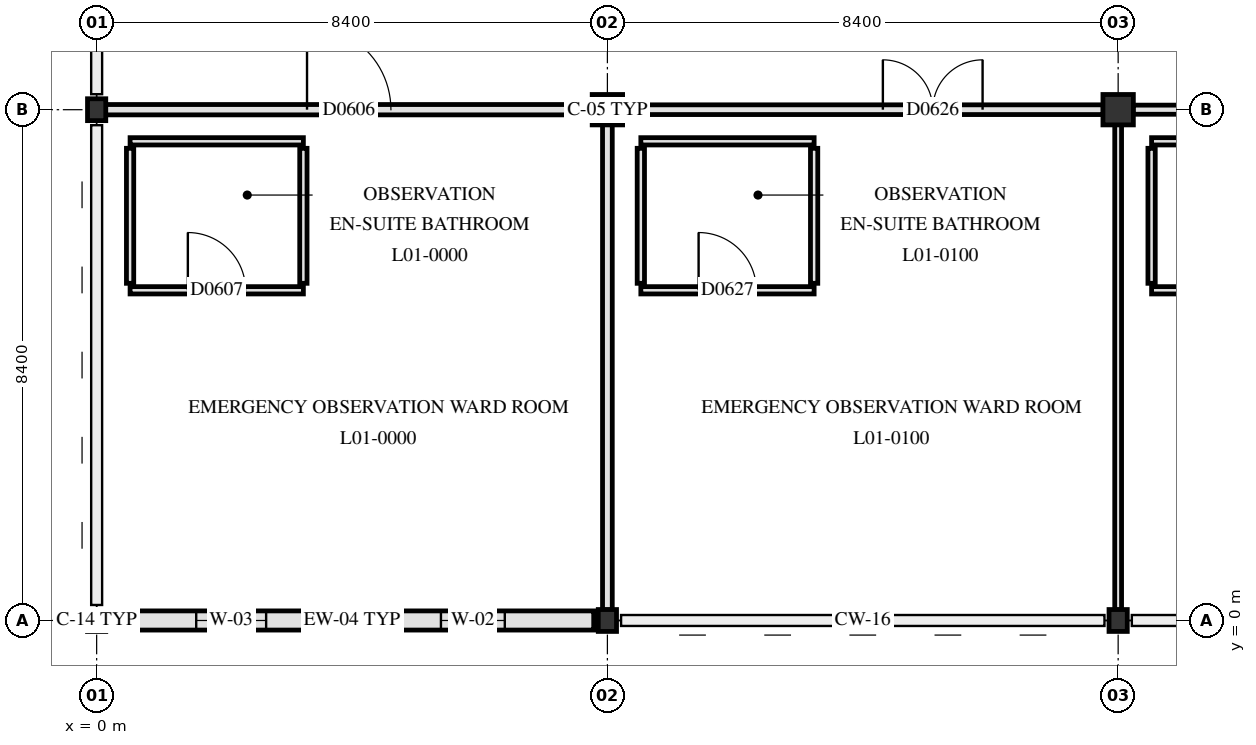
"""IFC4 building model, lengths in metres.
Left out: names, types, materials, properties, quantities, classifications, styles, units other than length and angle.
Written with IfcOpenShell. Run it as: python <this file> out.ifc"""

import sys

from ifc_helpers import new_model, si_unit, direction, frame, frame_2d, origin, origin_2d, place, context, subcontext, project, spatial, rectangle, i_section, extrude, element, fill, save


model = new_model("IFC4")
c1 = context("Model", 3, precision=1e-05, world=origin(), true_north=direction((0.0, 1.0)))
c2 = subcontext(c1, "Body", "Model", "MODEL_VIEW")
j1 = project(units=[si_unit("LENGTHUNIT", "METRE"), si_unit("PLANEANGLEUNIT", "RADIAN")], contexts=[c1])
p1 = place(None, origin())
s1 = spatial("IfcSite", under=j1, at=p1, CompositionType="ELEMENT")
p2 = place(p1, origin())
s2 = spatial("IfcBuilding", under=s1, at=p2, CompositionType="ELEMENT")
p3 = place(p2, frame((0.0, 0.0, 4.8)))
s3 = spatial("IfcBuildingStorey", under=s2, at=p3, CompositionType="ELEMENT", Elevation=4.8)
for number, where, z_axis, x_axis in (
    (1, (0.0, 0.0, 0.0), (0.0, 0.0, 1.0), (1.0, 0.0, 0.0)),
    (2, (0.0, 8.4, 0.0), (0.0, 0.0, 1.0), (1.0, 0.0, 0.0)),
    (3, (8.4, 0.0, 0.0), (0.0, 0.0, 1.0), (1.0, 0.0, 0.0)),
):
    element("IfcColumn", number, at=place(p3, frame(where, z_axis=z_axis, x_axis=x_axis)), inside=s3, PredefinedType="COLUMN", context=c2, shape_type="SweptSolid", body=[
        extrude(i_section(OverallWidth=0.3, OverallDepth=0.36, WebThickness=0.012, FlangeThickness=0.022, FilletRadius=0.027, at=origin_2d()), origin(), (0.0, 0.0, 1.0), 4.5),
    ])
p4 = place(p3, frame((8.4, 8.4, 0.0), z_axis=(0.0, 0.0, 1.0), x_axis=(1.0, 0.0, 0.0)))
e4 = element("IfcColumn", 4, at=p4, inside=s3, PredefinedType="COLUMN", context=c2, shape_type="SweptSolid", body=[
    extrude(rectangle(XDim=0.5, YDim=0.5, at=origin_2d()), origin(), (0.0, 0.0, 1.0), 4.5),
])
p5 = place(p3, frame((16.8, 0.0, 0.0), z_axis=(0.0, 0.0, 1.0), x_axis=(1.0, 0.0, 0.0)))
e5 = element("IfcColumn", 5, at=p5, inside=s3, PredefinedType="COLUMN", context=c2, shape_type="SweptSolid", body=[
    extrude(i_section(OverallWidth=0.3, OverallDepth=0.36, WebThickness=0.012, FlangeThickness=0.022, FilletRadius=0.027, at=origin_2d()), origin(), (0.0, 0.0, 1.0), 4.5),
])
p6 = place(p3, frame((16.8, 8.4, 0.0), z_axis=(0.0, 0.0, 1.0), x_axis=(1.0, 0.0, 0.0)))
e6 = element("IfcColumn", 6, at=p6, inside=s3, PredefinedType="COLUMN", context=c2, shape_type="SweptSolid", body=[
    extrude(rectangle(XDim=0.5, YDim=0.5, at=origin_2d()), origin(), (0.0, 0.0, 1.0), 4.5),
])
p7 = place(p3, frame((8.175, 0.0, 0.0), z_axis=(0.0, 0.0, 1.0), x_axis=(-1.0, 0.0, 0.0)))
e7 = element("IfcWall", 7, at=p7, inside=s3, PredefinedType="SOLIDWALL", context=c2, shape_type="SweptSolid", body=[
    extrude(rectangle(XDim=7.95, YDim=0.315, at=frame_2d((3.975, 0.0))), origin(), (0.0, 0.0, 1.0), 3.44),
])
p8 = place(p7, frame((1.462, 0.0, 0.85)))
e8 = element("IfcOpeningElement", 8, at=p8, cuts=e7, PredefinedType="OPENING", context=c2, shape_type="SweptSolid", body=[
    extrude(rectangle(XDim=1.05, YDim=1.3, at=frame_2d((0.525, 0.65))), frame((0.0, 0.167, 0.0), z_axis=(0.0, -1.0, 0.0), x_axis=(1.0, 0.0, 0.0)), (0.0, 0.0, 1.0), 0.335),
])
p9 = place(p7, frame((5.387, 0.0, 0.85)))
e9 = element("IfcOpeningElement", 9, at=p9, cuts=e7, PredefinedType="OPENING", context=c2, shape_type="SweptSolid", body=[
    extrude(rectangle(XDim=1.15, YDim=1.3, at=frame_2d((0.575, 0.65))), frame((0.0, 0.167, 0.0), z_axis=(0.0, -1.0, 0.0), x_axis=(1.0, 0.0, 0.0)), (0.0, 0.0, 1.0), 0.335),
])
p10 = place(p3, frame((0.55, 5.43, 0.0), z_axis=(0.0, 0.0, 1.0), x_axis=(1.0, 0.0, 0.0)))
e10 = element("IfcWall", 10, at=p10, inside=s3, PredefinedType="PARTITIONING", context=c2, shape_type="SweptSolid", body=[
    extrude(rectangle(XDim=2.85, YDim=0.12, at=frame_2d((1.425, 0.0))), origin(), (0.0, 0.0, 1.0), 4.14),
])
p11 = place(p10, frame((0.95, 0.0, 0.0)))
e11 = element("IfcOpeningElement", 11, at=p11, cuts=e10, PredefinedType="OPENING", context=c2, shape_type="SweptSolid", body=[
    extrude(rectangle(XDim=0.95, YDim=2.1, at=frame_2d((0.475, 1.05))), frame((0.0, 0.07, 0.0), z_axis=(0.0, -1.0, 0.0), x_axis=(1.0, 0.0, 0.0)), (0.0, 0.0, 1.0), 0.14),
])
p12 = place(p3, frame((8.95, 5.43, 0.0), z_axis=(0.0, 0.0, 1.0), x_axis=(1.0, 0.0, 0.0)))
e12 = element("IfcWall", 12, at=p12, inside=s3, PredefinedType="PARTITIONING", context=c2, shape_type="SweptSolid", body=[
    extrude(rectangle(XDim=2.85, YDim=0.12, at=frame_2d((1.425, 0.0))), origin(), (0.0, 0.0, 1.0), 4.14),
])
p13 = place(p12, frame((0.95, 0.0, 0.0)))
e13 = element("IfcOpeningElement", 13, at=p13, cuts=e12, PredefinedType="OPENING", context=c2, shape_type="SweptSolid", body=[
    extrude(rectangle(XDim=0.95, YDim=2.1, at=frame_2d((0.475, 1.05))), frame((0.0, 0.07, 0.0), z_axis=(0.0, -1.0, 0.0), x_axis=(1.0, 0.0, 0.0)), (0.0, 0.0, 1.0), 0.14),
])
p14 = place(p3, frame((17.35, 5.43, 0.0), z_axis=(0.0, 0.0, 1.0), x_axis=(1.0, 0.0, 0.0)))
e14 = element("IfcWall", 14, at=p14, inside=s3, PredefinedType="PARTITIONING", context=c2, shape_type="SweptSolid", body=[
    extrude(rectangle(XDim=2.85, YDim=0.12, at=frame_2d((1.425, 0.0))), origin(), (0.0, 0.0, 1.0), 4.14),
])
p15 = place(p14, frame((0.95, 0.0, 0.0)))
e15 = element("IfcOpeningElement", 15, at=p15, cuts=e14, PredefinedType="OPENING", context=c2, shape_type="SweptSolid", body=[
    extrude(rectangle(XDim=0.95, YDim=2.1, at=frame_2d((0.475, 1.05))), frame((0.0, 0.07, 0.0), z_axis=(0.0, -1.0, 0.0), x_axis=(1.0, 0.0, 0.0)), (0.0, 0.0, 1.0), 0.14),
])
p16 = place(p3, frame((0.55, 7.88, 0.0), z_axis=(0.0, 0.0, 1.0), x_axis=(1.0, 0.0, 0.0)))
e16 = element("IfcWall", 16, at=p16, inside=s3, PredefinedType="PARTITIONING", context=c2, shape_type="SweptSolid", body=[
    extrude(rectangle(XDim=2.85, YDim=0.12, at=frame_2d((1.425, 0.0))), origin(), (0.0, 0.0, 1.0), 4.14),
])
p17 = place(p3, frame((8.95, 7.88, 0.0), z_axis=(0.0, 0.0, 1.0), x_axis=(1.0, 0.0, 0.0)))
e17 = element("IfcWall", 17, at=p17, inside=s3, PredefinedType="PARTITIONING", context=c2, shape_type="SweptSolid", body=[
    extrude(rectangle(XDim=2.85, YDim=0.12, at=frame_2d((1.425, 0.0))), origin(), (0.0, 0.0, 1.0), 4.14),
])
p18 = place(p3, frame((17.35, 7.88, 0.0), z_axis=(0.0, 0.0, 1.0), x_axis=(1.0, 0.0, 0.0)))
e18 = element("IfcWall", 18, at=p18, inside=s3, PredefinedType="PARTITIONING", context=c2, shape_type="SweptSolid", body=[
    extrude(rectangle(XDim=2.85, YDim=0.12, at=frame_2d((1.425, 0.0))), origin(), (0.0, 0.0, 1.0), 4.14),
])
p19 = place(p3, frame((0.145, 8.4, 0.0), z_axis=(0.0, 0.0, 1.0), x_axis=(1.0, 0.0, 0.0)))
e19 = element("IfcWall", 19, at=p19, inside=s3, PredefinedType="PARTITIONING", context=c2, shape_type="SweptSolid", body=[
    extrude(rectangle(XDim=8.01, YDim=0.17, at=frame_2d((4.005, 0.0))), origin(), (0.0, 0.0, 1.0), 3.54),
])
p20 = place(p19, frame((3.315, 0.0, 0.0)))
e20 = element("IfcOpeningElement", 20, at=p20, cuts=e19, PredefinedType="OPENING", context=c2, shape_type="SweptSolid", body=[
    extrude(rectangle(XDim=1.38, YDim=2.22, at=frame_2d((0.69, 1.11))), frame((0.0, 0.095, 0.0), z_axis=(0.0, -1.0, 0.0), x_axis=(1.0, 0.0, 0.0)), (0.0, 0.0, 1.0), 0.19),
])
p21 = place(p3, frame((8.645, 8.4, 0.0), z_axis=(0.0, 0.0, 1.0), x_axis=(1.0, 0.0, 0.0)))
e21 = element("IfcWall", 21, at=p21, inside=s3, PredefinedType="PARTITIONING", context=c2, shape_type="SweptSolid", body=[
    extrude(rectangle(XDim=7.91, YDim=0.16, at=frame_2d((3.955, 0.0))), origin(), (0.0, 0.0, 1.0), 3.54),
])
p22 = place(p21, frame((4.285, 0.0, 0.0)))
e22 = element("IfcOpeningElement", 22, at=p22, cuts=e21, PredefinedType="OPENING", context=c2, shape_type="SweptSolid", body=[
    extrude(rectangle(XDim=1.64, YDim=2.28, at=frame_2d((0.82, 1.14))), frame((0.0, 0.09, 0.0), z_axis=(0.0, -1.0, 0.0), x_axis=(1.0, 0.0, 0.0)), (0.0, 0.0, 1.0), 0.18),
])
p23 = place(p3, frame((17.045, 8.4, 0.0), z_axis=(0.0, 0.0, 1.0), x_axis=(1.0, 0.0, 0.0)))
e23 = element("IfcWall", 23, at=p23, inside=s3, PredefinedType="PARTITIONING", context=c2, shape_type="SweptSolid", body=[
    extrude(rectangle(XDim=7.91, YDim=0.15, at=frame_2d((3.955, 0.0))), origin(), (0.0, 0.0, 1.0), 3.54),
])
p24 = place(p23, frame((4.256, 0.0, 0.0)))
e24 = element("IfcOpeningElement", 24, at=p24, cuts=e23, PredefinedType="OPENING", context=c2, shape_type="SweptSolid", body=[
    extrude(rectangle(XDim=1.7, YDim=2.25, at=frame_2d((0.85, 1.125))), frame((0.0, 0.085, 0.0), z_axis=(0.0, -1.0, 0.0), x_axis=(1.0, 0.0, 0.0)), (0.0, 0.0, 1.0), 0.17),
])
for number, where, z_axis, x_axis in (
    (25, (0.55, 5.545, 0.0), (0.0, 0.0, 1.0), (0.0, 1.0, 0.0)),
    (26, (3.4, 5.545, 0.0), (0.0, 0.0, 1.0), (0.0, 1.0, 0.0)),
):
    element("IfcWall", number, at=place(p3, frame(where, z_axis=z_axis, x_axis=x_axis)), inside=s3, PredefinedType="PARTITIONING", context=c2, shape_type="SweptSolid", body=[
        extrude(rectangle(XDim=2.22, YDim=0.12, at=frame_2d((1.11, 0.0))), origin(), (0.0, 0.0, 1.0), 4.14),
    ])
p25 = place(p3, frame((8.4, 0.175, 0.0), z_axis=(0.0, 0.0, 1.0), x_axis=(0.0, 1.0, 0.0)))
e27 = element("IfcWall", 27, at=p25, inside=s3, PredefinedType="PARTITIONING", context=c2, shape_type="SweptSolid", body=[
    extrude(rectangle(XDim=7.98, YDim=0.16, at=frame_2d((3.99, 0.0))), origin(), (0.0, 0.0, 1.0), 3.59),
])
for number, where, z_axis, x_axis in (
    (28, (8.95, 5.545, 0.0), (0.0, 0.0, 1.0), (0.0, 1.0, 0.0)),
    (29, (11.8, 5.545, 0.0), (0.0, 0.0, 1.0), (0.0, 1.0, 0.0)),
):
    element("IfcWall", number, at=place(p3, frame(where, z_axis=z_axis, x_axis=x_axis)), inside=s3, PredefinedType="PARTITIONING", context=c2, shape_type="SweptSolid", body=[
        extrude(rectangle(XDim=2.22, YDim=0.12, at=frame_2d((1.11, 0.0))), origin(), (0.0, 0.0, 1.0), 4.14),
    ])
p26 = place(p3, frame((16.8, 0.175, 0.0), z_axis=(0.0, 0.0, 1.0), x_axis=(0.0, 1.0, 0.0)))
e30 = element("IfcWall", 30, at=p26, inside=s3, PredefinedType="PARTITIONING", context=c2, shape_type="SweptSolid", body=[
    extrude(rectangle(XDim=7.98, YDim=0.112, at=frame_2d((3.99, 0.0))), origin(), (0.0, 0.0, 1.0), 3.59),
])
p27 = place(p3, frame((17.35, 5.545, 0.0), z_axis=(0.0, 0.0, 1.0), x_axis=(0.0, 1.0, 0.0)))
e31 = element("IfcWall", 31, at=p27, inside=s3, PredefinedType="PARTITIONING", context=c2, shape_type="SweptSolid", body=[
    extrude(rectangle(XDim=2.22, YDim=0.12, at=frame_2d((1.11, 0.0))), origin(), (0.0, 0.0, 1.0), 4.14),
])
p28 = place(p8, origin())
e32 = element("IfcWindow", 32, at=p28, inside=s3, PartitioningType="SINGLE_PANEL", PredefinedType="WINDOW", context=c2, shape_type="SweptSolid", body=[
    extrude(rectangle(XDim=1.05, YDim=1.3, at=frame_2d((0.525, 0.65))), frame((0.0, 0.03, 0.0), z_axis=(0.0, -1.0, 0.0), x_axis=(1.0, 0.0, 0.0)), (0.0, 0.0, 1.0), 0.06),
])
fill(e8, e32)
p29 = place(p9, origin())
e33 = element("IfcWindow", 33, at=p29, inside=s3, PartitioningType="SINGLE_PANEL", PredefinedType="WINDOW", context=c2, shape_type="SweptSolid", body=[
    extrude(rectangle(XDim=1.15, YDim=1.3, at=frame_2d((0.575, 0.65))), frame((0.0, 0.03, 0.0), z_axis=(0.0, -1.0, 0.0), x_axis=(1.0, 0.0, 0.0)), (0.0, 0.0, 1.0), 0.06),
])
fill(e9, e33)
p30 = place(p20, origin())
e34 = element("IfcDoor", 34, at=p30, inside=s3, OperationType="SINGLE_SWING_LEFT", PredefinedType="DOOR", context=c2, shape_type="SweptSolid", body=[
    extrude(rectangle(XDim=1.38, YDim=2.22, at=frame_2d((0.69, 1.11))), frame((0.0, 0.025, 0.0), z_axis=(0.0, -1.0, 0.0), x_axis=(1.0, 0.0, 0.0)), (0.0, 0.0, 1.0), 0.05),
])
fill(e20, e34)
p31 = place(p11, origin())
e35 = element("IfcDoor", 35, at=p31, inside=s3, OperationType="SINGLE_SWING_LEFT", PredefinedType="DOOR", context=c2, shape_type="SweptSolid", body=[
    extrude(rectangle(XDim=0.95, YDim=2.1, at=frame_2d((0.475, 1.05))), frame((0.0, 0.025, 0.0), z_axis=(0.0, -1.0, 0.0), x_axis=(1.0, 0.0, 0.0)), (0.0, 0.0, 1.0), 0.05),
])
fill(e11, e35)
p32 = place(p22, origin())
e36 = element("IfcDoor", 36, at=p32, inside=s3, OperationType="DOUBLE_SWING_LEFT", PredefinedType="DOOR", context=c2, shape_type="SweptSolid", body=[
    extrude(rectangle(XDim=1.64, YDim=2.28, at=frame_2d((0.82, 1.14))), frame((0.0, 0.025, 0.0), z_axis=(0.0, -1.0, 0.0), x_axis=(1.0, 0.0, 0.0)), (0.0, 0.0, 1.0), 0.05),
])
fill(e22, e36)
p33 = place(p13, origin())
e37 = element("IfcDoor", 37, at=p33, inside=s3, OperationType="SINGLE_SWING_LEFT", PredefinedType="DOOR", context=c2, shape_type="SweptSolid", body=[
    extrude(rectangle(XDim=0.95, YDim=2.1, at=frame_2d((0.475, 1.05))), frame((0.0, 0.025, 0.0), z_axis=(0.0, -1.0, 0.0), x_axis=(1.0, 0.0, 0.0)), (0.0, 0.0, 1.0), 0.05),
])
fill(e13, e37)
save(model, sys.argv[1])
